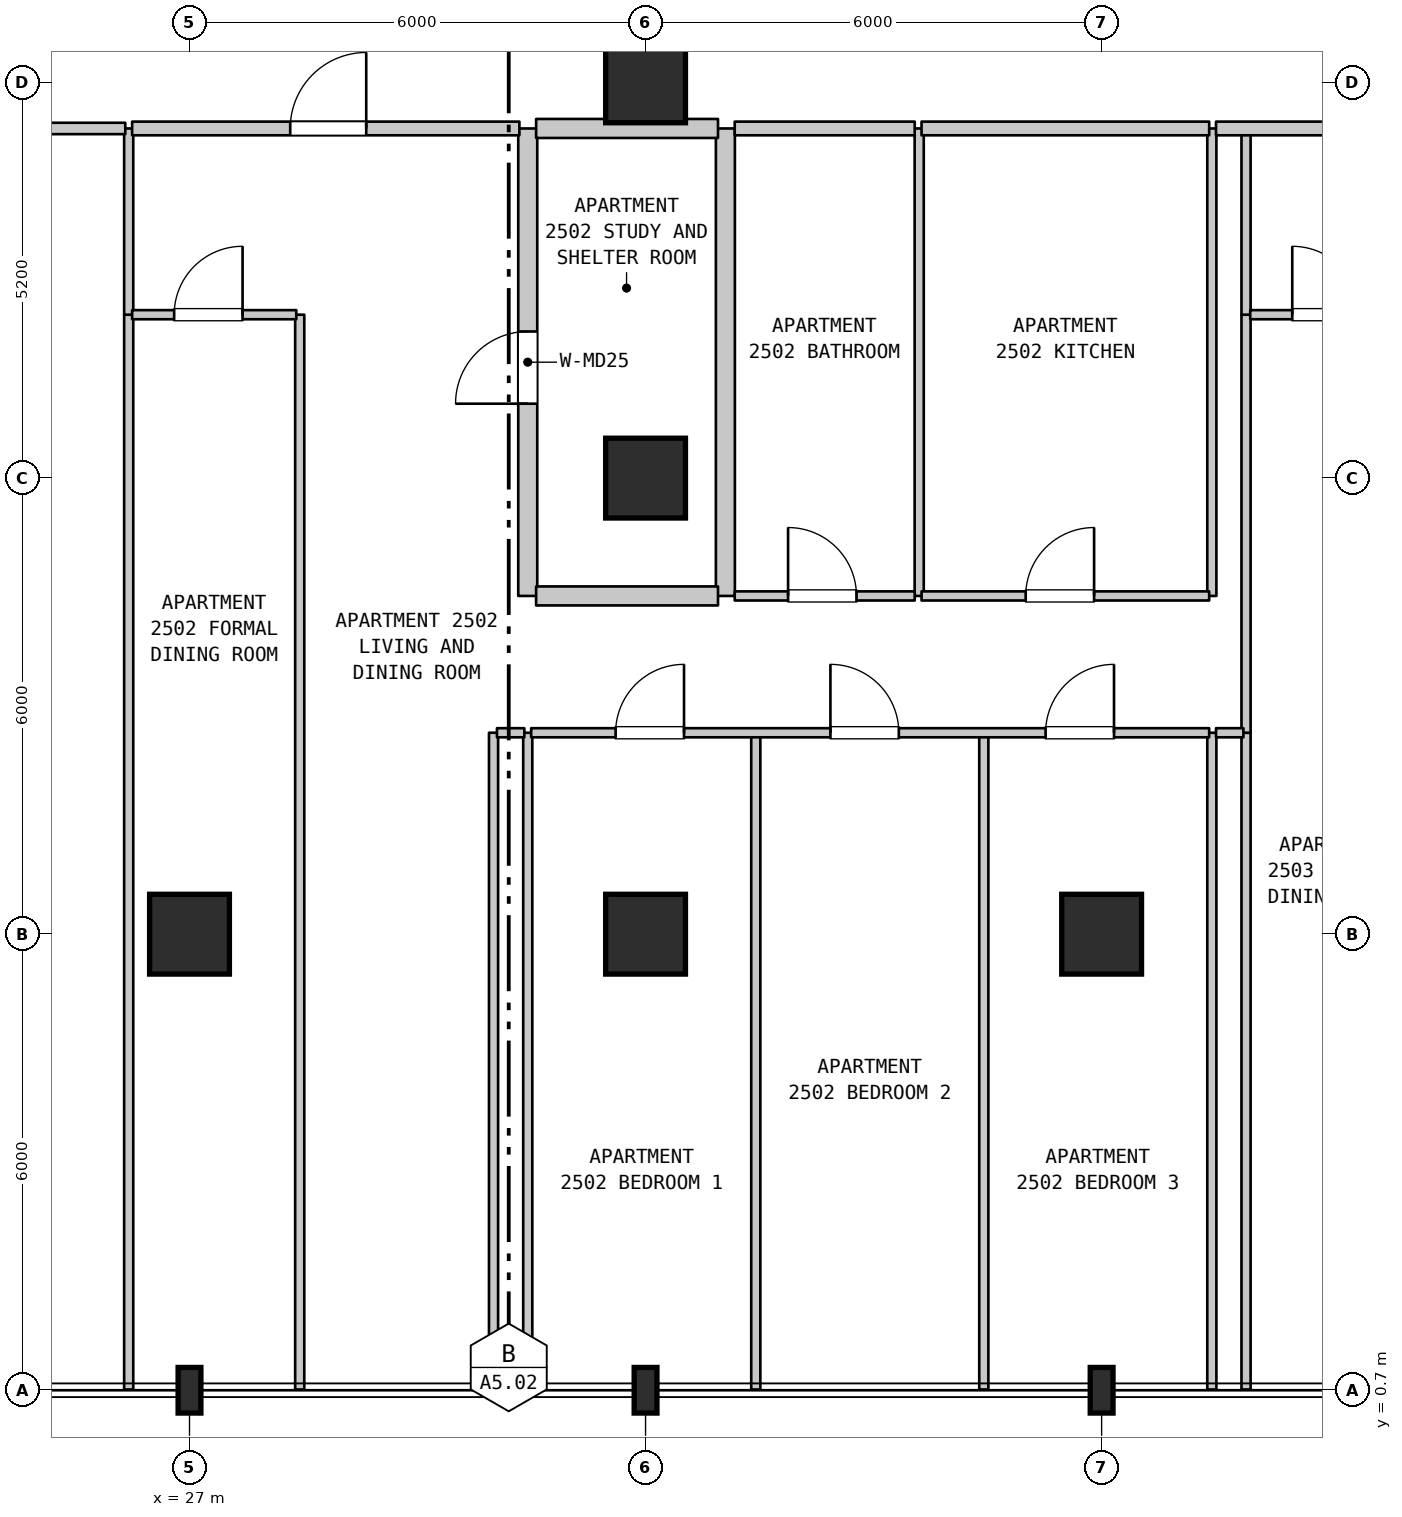
"""IFC4 building model, lengths in metres.
Left out: names, types, materials, properties, quantities, classifications, styles, units other than length and angle.
Written with IfcOpenShell. Run it as: python <this file> out.ifc"""

import sys

from ifc_helpers import new_model, si_unit, direction, frame, frame_2d, origin, origin_2d, place, context, subcontext, project, spatial, rectangle, i_section, extrude, element, fill, save


model = new_model("IFC4")
c1 = context("Model", 3, precision=1e-05, world=origin(), true_north=direction((0.0, 1.0)))
c2 = subcontext(c1, "Body", "Model", "MODEL_VIEW")
j1 = project(units=[si_unit("LENGTHUNIT", "METRE"), si_unit("PLANEANGLEUNIT", "RADIAN")], contexts=[c1])
p1 = place(None, origin())
s1 = spatial("IfcSite", under=j1, at=p1, CompositionType="ELEMENT")
p2 = place(p1, origin())
s2 = spatial("IfcBuilding", under=s1, at=p2, CompositionType="ELEMENT")
p3 = place(p2, frame((0.0, 0.0, 105.7)))
s3 = spatial("IfcBuildingStorey", under=s2, at=p3, CompositionType="ELEMENT", Elevation=105.7)
p4 = place(p3, frame((27.0, 0.7, 0.0), z_axis=(0.0, 0.0, 1.0), x_axis=(1.0, 0.0, 0.0)))
e1 = element("IfcColumn", 1, at=p4, inside=s3, PredefinedType="COLUMN", context=c2, shape_type="SweptSolid", body=[
    extrude(i_section(OverallWidth=0.3, OverallDepth=0.6, WebThickness=0.015, FlangeThickness=0.03, FilletRadius=0.027, at=origin_2d()), origin(), (0.0, 0.0, 1.0), 3.7),
])
p5 = place(p3, frame((27.0, 6.7, 0.0), z_axis=(0.0, 0.0, 1.0), x_axis=(1.0, 0.0, 0.0)))
e2 = element("IfcColumn", 2, at=p5, inside=s3, PredefinedType="COLUMN", context=c2, shape_type="SweptSolid", body=[
    extrude(rectangle(XDim=1.05, YDim=1.05, at=origin_2d()), origin(), (0.0, 0.0, 1.0), 3.7),
])
p6 = place(p3, frame((33.0, 0.7, 0.0), z_axis=(0.0, 0.0, 1.0), x_axis=(1.0, 0.0, 0.0)))
e3 = element("IfcColumn", 3, at=p6, inside=s3, PredefinedType="COLUMN", context=c2, shape_type="SweptSolid", body=[
    extrude(i_section(OverallWidth=0.3, OverallDepth=0.6, WebThickness=0.015, FlangeThickness=0.03, FilletRadius=0.027, at=origin_2d()), origin(), (0.0, 0.0, 1.0), 3.7),
])
for number, where, z_axis, x_axis in (
    (4, (33.0, 6.7, 0.0), (0.0, 0.0, 1.0), (1.0, 0.0, 0.0)),
    (5, (33.0, 12.7, 0.0), (0.0, 0.0, 1.0), (1.0, 0.0, 0.0)),
    (6, (33.0, 17.9, 0.0), (0.0, 0.0, 1.0), (1.0, 0.0, 0.0)),
):
    element("IfcColumn", number, at=place(p3, frame(where, z_axis=z_axis, x_axis=x_axis)), inside=s3, PredefinedType="COLUMN", context=c2, shape_type="SweptSolid", body=[
        extrude(rectangle(XDim=1.05, YDim=1.05, at=origin_2d()), origin(), (0.0, 0.0, 1.0), 3.7),
    ])
p7 = place(p3, frame((39.0, 0.7, 0.0), z_axis=(0.0, 0.0, 1.0), x_axis=(1.0, 0.0, 0.0)))
e7 = element("IfcColumn", 7, at=p7, inside=s3, PredefinedType="COLUMN", context=c2, shape_type="SweptSolid", body=[
    extrude(i_section(OverallWidth=0.3, OverallDepth=0.6, WebThickness=0.015, FlangeThickness=0.03, FilletRadius=0.027, at=origin_2d()), origin(), (0.0, 0.0, 1.0), 3.7),
])
p8 = place(p3, frame((39.0, 6.7, 0.0), z_axis=(0.0, 0.0, 1.0), x_axis=(1.0, 0.0, 0.0)))
e8 = element("IfcColumn", 8, at=p8, inside=s3, PredefinedType="COLUMN", context=c2, shape_type="SweptSolid", body=[
    extrude(rectangle(XDim=1.05, YDim=1.05, at=origin_2d()), origin(), (0.0, 0.0, 1.0), 3.7),
])
p9 = place(p3, frame((26.2, 0.71, 0.0), z_axis=(0.0, 0.0, 1.0), x_axis=(0.0, 1.0, 0.0)))
e9 = element("IfcWall", 9, at=p9, inside=s3, PredefinedType="PARTITIONING", context=c2, shape_type="SweptSolid", body=[
    extrude(rectangle(XDim=14.14, YDim=0.12, at=frame_2d((7.07, 0.0))), origin(), (0.0, 0.0, 1.0), 3.385),
])
p10 = place(p3, frame((26.2, 14.85, 0.0), z_axis=(0.0, 0.0, 1.0), x_axis=(0.0, 1.0, 0.0)))
e10 = element("IfcWall", 10, at=p10, inside=s3, PredefinedType="PARTITIONING", context=c2, shape_type="SweptSolid", body=[
    extrude(rectangle(XDim=2.45, YDim=0.12, at=frame_2d((1.225, 0.0))), origin(), (0.0, 0.0, 1.0), 3.385),
])
p11 = place(p3, frame((28.45, 0.71, 0.0), z_axis=(0.0, 0.0, 1.0), x_axis=(0.0, 1.0, 0.0)))
e11 = element("IfcWall", 11, at=p11, inside=s3, PredefinedType="PARTITIONING", context=c2, shape_type="SweptSolid", body=[
    extrude(rectangle(XDim=14.14, YDim=0.12, at=frame_2d((7.07, 0.0))), origin(), (0.0, 0.0, 1.0), 3.385),
])
for number, where, z_axis, x_axis in (
    (12, (31.0, 0.71, 0.0), (0.0, 0.0, 1.0), (0.0, 1.0, 0.0)),
    (13, (31.45, 0.71, 0.0), (0.0, 0.0, 1.0), (0.0, 1.0, 0.0)),
):
    element("IfcWall", number, at=place(p3, frame(where, z_axis=z_axis, x_axis=x_axis)), inside=s3, PredefinedType="PARTITIONING", context=c2, shape_type="SweptSolid", body=[
        extrude(rectangle(XDim=8.64, YDim=0.12, at=frame_2d((4.32, 0.0))), origin(), (0.0, 0.0, 1.0), 3.385),
    ])
p12 = place(p3, frame((31.45, 11.15, 0.0), z_axis=(0.0, 0.0, 1.0), x_axis=(0.0, 1.0, 0.0)))
e14 = element("IfcWall", 14, at=p12, inside=s3, PredefinedType="STANDARD", context=c2, shape_type="SweptSolid", body=[
    extrude(rectangle(XDim=6.15, YDim=0.25, at=frame_2d((3.075, 0.0))), origin(), (0.0, 0.0, 1.0), 3.385),
])
p13 = place(p12, frame((2.529, 0.0, 0.0)))
e15 = element("IfcOpeningElement", 15, at=p13, cuts=e14, PredefinedType="OPENING", context=c2, shape_type="SweptSolid", body=[
    extrude(rectangle(XDim=0.95, YDim=2.15, at=frame_2d((0.475, 1.075))), frame((0.0, 0.135, 0.0), z_axis=(0.0, -1.0, 0.0), x_axis=(1.0, 0.0, 0.0)), (0.0, 0.0, 1.0), 0.27),
])
p14 = place(p3, frame((34.05, 11.15, 0.0), z_axis=(0.0, 0.0, 1.0), x_axis=(0.0, 1.0, 0.0)))
e16 = element("IfcWall", 16, at=p14, inside=s3, PredefinedType="STANDARD", context=c2, shape_type="SweptSolid", body=[
    extrude(rectangle(XDim=6.15, YDim=0.25, at=frame_2d((3.075, 0.0))), origin(), (0.0, 0.0, 1.0), 3.385),
])
p15 = place(p3, frame((34.45, 0.71, 0.0), z_axis=(0.0, 0.0, 1.0), x_axis=(0.0, 1.0, 0.0)))
e17 = element("IfcWall", 17, at=p15, inside=s3, PredefinedType="PARTITIONING", context=c2, shape_type="SweptSolid", body=[
    extrude(rectangle(XDim=8.64, YDim=0.12, at=frame_2d((4.32, 0.0))), origin(), (0.0, 0.0, 1.0), 3.385),
])
p16 = place(p3, frame((36.6, 11.15, 0.0), z_axis=(0.0, 0.0, 1.0), x_axis=(0.0, 1.0, 0.0)))
e18 = element("IfcWall", 18, at=p16, inside=s3, PredefinedType="PARTITIONING", context=c2, shape_type="SweptSolid", body=[
    extrude(rectangle(XDim=6.15, YDim=0.12, at=frame_2d((3.075, 0.0))), origin(), (0.0, 0.0, 1.0), 3.385),
])
for number, where, z_axis, x_axis in (
    (19, (37.45, 0.71, 0.0), (0.0, 0.0, 1.0), (0.0, 1.0, 0.0)),
    (20, (40.45, 0.71, 0.0), (0.0, 0.0, 1.0), (0.0, 1.0, 0.0)),
):
    element("IfcWall", number, at=place(p3, frame(where, z_axis=z_axis, x_axis=x_axis)), inside=s3, PredefinedType="PARTITIONING", context=c2, shape_type="SweptSolid", body=[
        extrude(rectangle(XDim=8.64, YDim=0.12, at=frame_2d((4.32, 0.0))), origin(), (0.0, 0.0, 1.0), 3.385),
    ])
p17 = place(p3, frame((40.45, 11.15, 0.0), z_axis=(0.0, 0.0, 1.0), x_axis=(0.0, 1.0, 0.0)))
e21 = element("IfcWall", 21, at=p17, inside=s3, PredefinedType="PARTITIONING", context=c2, shape_type="SweptSolid", body=[
    extrude(rectangle(XDim=6.15, YDim=0.12, at=frame_2d((3.075, 0.0))), origin(), (0.0, 0.0, 1.0), 3.385),
])
p18 = place(p3, frame((40.9, 0.71, 0.0), z_axis=(0.0, 0.0, 1.0), x_axis=(0.0, 1.0, 0.0)))
e22 = element("IfcWall", 22, at=p18, inside=s3, PredefinedType="PARTITIONING", context=c2, shape_type="SweptSolid", body=[
    extrude(rectangle(XDim=8.64, YDim=0.12, at=frame_2d((4.32, 0.0))), origin(), (0.0, 0.0, 1.0), 3.385),
])
p19 = place(p3, frame((40.9, 9.35, 0.0), z_axis=(0.0, 0.0, 1.0), x_axis=(0.0, 1.0, 0.0)))
e23 = element("IfcWall", 23, at=p19, inside=s3, PredefinedType="PARTITIONING", context=c2, shape_type="SweptSolid", body=[
    extrude(rectangle(XDim=5.5, YDim=0.12, at=frame_2d((2.75, 0.0))), origin(), (0.0, 0.0, 1.0), 3.385),
])
p20 = place(p3, frame((40.9, 14.85, 0.0), z_axis=(0.0, 0.0, 1.0), x_axis=(0.0, 1.0, 0.0)))
e24 = element("IfcWall", 24, at=p20, inside=s3, PredefinedType="PARTITIONING", context=c2, shape_type="SweptSolid", body=[
    extrude(rectangle(XDim=2.45, YDim=0.12, at=frame_2d((1.225, 0.0))), origin(), (0.0, 0.0, 1.0), 3.385),
])
p21 = place(p3, frame((31.045, 9.35, 0.0), z_axis=(0.0, 0.0, 1.0), x_axis=(1.0, 0.0, 0.0)))
e25 = element("IfcWall", 25, at=p21, inside=s3, PredefinedType="PARTITIONING", context=c2, shape_type="SweptSolid", body=[
    extrude(rectangle(XDim=0.36, YDim=0.12, at=frame_2d((0.18, 0.0))), origin(), (0.0, 0.0, 1.0), 3.385),
])
p22 = place(p3, frame((31.495, 9.35, 0.0), z_axis=(0.0, 0.0, 1.0), x_axis=(1.0, 0.0, 0.0)))
e26 = element("IfcWall", 26, at=p22, inside=s3, PredefinedType="PARTITIONING", context=c2, shape_type="SweptSolid", body=[
    extrude(rectangle(XDim=8.92, YDim=0.12, at=frame_2d((4.46, 0.0))), origin(), (0.0, 0.0, 1.0), 3.385),
])
p23 = place(p22, frame((1.111, 0.0, 0.0)))
e27 = element("IfcOpeningElement", 27, at=p23, cuts=e26, PredefinedType="OPENING", context=c2, shape_type="SweptSolid", body=[
    extrude(rectangle(XDim=0.9, YDim=2.15, at=frame_2d((0.45, 1.075))), frame((0.0, 0.07, 0.0), z_axis=(0.0, -1.0, 0.0), x_axis=(1.0, 0.0, 0.0)), (0.0, 0.0, 1.0), 0.14),
])
p24 = place(p22, frame((3.937, 0.0, 0.0)))
e28 = element("IfcOpeningElement", 28, at=p24, cuts=e26, PredefinedType="OPENING", context=c2, shape_type="SweptSolid", body=[
    extrude(rectangle(XDim=0.9, YDim=2.15, at=frame_2d((0.45, 1.075))), frame((0.0, 0.07, 0.0), z_axis=(0.0, -1.0, 0.0), x_axis=(1.0, 0.0, 0.0)), (0.0, 0.0, 1.0), 0.14),
])
p25 = place(p22, frame((6.768, 0.0, 0.0)))
e29 = element("IfcOpeningElement", 29, at=p25, cuts=e26, PredefinedType="OPENING", context=c2, shape_type="SweptSolid", body=[
    extrude(rectangle(XDim=0.9, YDim=2.15, at=frame_2d((0.45, 1.075))), frame((0.0, 0.07, 0.0), z_axis=(0.0, -1.0, 0.0), x_axis=(1.0, 0.0, 0.0)), (0.0, 0.0, 1.0), 0.14),
])
p26 = place(p3, frame((40.505, 9.35, 0.0), z_axis=(0.0, 0.0, 1.0), x_axis=(1.0, 0.0, 0.0)))
e30 = element("IfcWall", 30, at=p26, inside=s3, PredefinedType="PARTITIONING", context=c2, shape_type="SweptSolid", body=[
    extrude(rectangle(XDim=0.36, YDim=0.12, at=frame_2d((0.18, 0.0))), origin(), (0.0, 0.0, 1.0), 3.385),
])
p27 = place(p3, frame((31.56, 11.15, 0.0), z_axis=(0.0, 0.0, 1.0), x_axis=(1.0, 0.0, 0.0)))
e31 = element("IfcWall", 31, at=p27, inside=s3, PredefinedType="STANDARD", context=c2, shape_type="SweptSolid", body=[
    extrude(rectangle(XDim=2.393, YDim=0.25, at=frame_2d((1.196, 0.0))), origin(), (0.0, 0.0, 1.0), 3.385),
])
p28 = place(p3, frame((34.173, 11.15, 0.0), z_axis=(0.0, 0.0, 1.0), x_axis=(1.0, 0.0, 0.0)))
e32 = element("IfcWall", 32, at=p28, inside=s3, PredefinedType="PARTITIONING", context=c2, shape_type="SweptSolid", body=[
    extrude(rectangle(XDim=2.368, YDim=0.12, at=frame_2d((1.184, 0.0))), origin(), (0.0, 0.0, 1.0), 3.385),
])
p29 = place(p28, frame((0.702, 0.0, 0.0)))
e33 = element("IfcOpeningElement", 33, at=p29, cuts=e32, PredefinedType="OPENING", context=c2, shape_type="SweptSolid", body=[
    extrude(rectangle(XDim=0.9, YDim=2.1, at=frame_2d((0.45, 1.05))), frame((0.0, 0.07, 0.0), z_axis=(0.0, -1.0, 0.0), x_axis=(1.0, 0.0, 0.0)), (0.0, 0.0, 1.0), 0.14),
])
p30 = place(p3, frame((36.631, 11.15, 0.0), z_axis=(0.0, 0.0, 1.0), x_axis=(1.0, 0.0, 0.0)))
e34 = element("IfcWall", 34, at=p30, inside=s3, PredefinedType="PARTITIONING", context=c2, shape_type="SweptSolid", body=[
    extrude(rectangle(XDim=3.784, YDim=0.12, at=frame_2d((1.892, 0.0))), origin(), (0.0, 0.0, 1.0), 3.385),
])
p31 = place(p30, frame((1.37, 0.0, 0.0)))
e35 = element("IfcOpeningElement", 35, at=p31, cuts=e34, PredefinedType="OPENING", context=c2, shape_type="SweptSolid", body=[
    extrude(rectangle(XDim=0.9, YDim=2.15, at=frame_2d((0.45, 1.075))), frame((0.0, 0.07, 0.0), z_axis=(0.0, -1.0, 0.0), x_axis=(1.0, 0.0, 0.0)), (0.0, 0.0, 1.0), 0.14),
])
p32 = place(p3, frame((26.245, 14.85, 0.0), z_axis=(0.0, 0.0, 1.0), x_axis=(1.0, 0.0, 0.0)))
e36 = element("IfcWall", 36, at=p32, inside=s3, PredefinedType="PARTITIONING", context=c2, shape_type="SweptSolid", body=[
    extrude(rectangle(XDim=2.16, YDim=0.12, at=frame_2d((1.08, 0.0))), origin(), (0.0, 0.0, 1.0), 3.385),
])
p33 = place(p32, frame((0.553, 0.0, 0.0)))
e37 = element("IfcOpeningElement", 37, at=p33, cuts=e36, PredefinedType="OPENING", context=c2, shape_type="SweptSolid", body=[
    extrude(rectangle(XDim=0.9, YDim=2.15, at=frame_2d((0.45, 1.075))), frame((0.0, 0.07, 0.0), z_axis=(0.0, -1.0, 0.0), x_axis=(1.0, 0.0, 0.0)), (0.0, 0.0, 1.0), 0.14),
])
p34 = place(p3, frame((40.955, 14.85, 0.0), z_axis=(0.0, 0.0, 1.0), x_axis=(1.0, 0.0, 0.0)))
e38 = element("IfcWall", 38, at=p34, inside=s3, PredefinedType="PARTITIONING", context=c2, shape_type="SweptSolid", body=[
    extrude(rectangle(XDim=2.16, YDim=0.12, at=frame_2d((1.08, 0.0))), origin(), (0.0, 0.0, 1.0), 3.385),
])
p35 = place(p34, frame((0.553, 0.0, 0.0)))
e39 = element("IfcOpeningElement", 39, at=p35, cuts=e38, PredefinedType="OPENING", context=c2, shape_type="SweptSolid", body=[
    extrude(rectangle(XDim=0.9, YDim=2.15, at=frame_2d((0.45, 1.075))), frame((0.0, 0.07, 0.0), z_axis=(0.0, -1.0, 0.0), x_axis=(1.0, 0.0, 0.0)), (0.0, 0.0, 1.0), 0.14),
])
p36 = place(p3, frame((21.245, 17.3, 0.0), z_axis=(0.0, 0.0, 1.0), x_axis=(1.0, 0.0, 0.0)))
e40 = element("IfcWall", 40, at=p36, inside=s3, PredefinedType="STANDARD", context=c2, shape_type="SweptSolid", body=[
    extrude(rectangle(XDim=4.91, YDim=0.15, at=frame_2d((2.455, 0.0))), origin(), (0.0, 0.0, 1.0), 3.385),
])
p37 = place(p36, frame((1.884, 0.0, 0.0)))
e41 = element("IfcOpeningElement", 41, at=p37, cuts=e40, PredefinedType="OPENING", context=c2, shape_type="SweptSolid", body=[
    extrude(rectangle(XDim=1.0, YDim=2.15, at=frame_2d((0.5, 1.075))), frame((0.0, 0.085, 0.0), z_axis=(0.0, -1.0, 0.0), x_axis=(1.0, 0.0, 0.0)), (0.0, 0.0, 1.0), 0.17),
])
p38 = place(p3, frame((26.245, 17.3, 0.0), z_axis=(0.0, 0.0, 1.0), x_axis=(1.0, 0.0, 0.0)))
e42 = element("IfcWall", 42, at=p38, inside=s3, PredefinedType="STANDARD", context=c2, shape_type="SweptSolid", body=[
    extrude(rectangle(XDim=5.095, YDim=0.18, at=frame_2d((2.547, 0.0))), origin(), (0.0, 0.0, 1.0), 3.385),
])
p39 = place(p38, frame((2.08, 0.0, 0.0)))
e43 = element("IfcOpeningElement", 43, at=p39, cuts=e42, PredefinedType="OPENING", context=c2, shape_type="SweptSolid", body=[
    extrude(rectangle(XDim=1.0, YDim=2.15, at=frame_2d((0.5, 1.075))), frame((0.0, 0.1, 0.0), z_axis=(0.0, -1.0, 0.0), x_axis=(1.0, 0.0, 0.0)), (0.0, 0.0, 1.0), 0.2),
])
p40 = place(p3, frame((31.56, 17.3, 0.0), z_axis=(0.0, 0.0, 1.0), x_axis=(1.0, 0.0, 0.0)))
e44 = element("IfcWall", 44, at=p40, inside=s3, PredefinedType="STANDARD", context=c2, shape_type="SweptSolid", body=[
    extrude(rectangle(XDim=2.393, YDim=0.25, at=frame_2d((1.196, 0.0))), origin(), (0.0, 0.0, 1.0), 3.385),
])
p41 = place(p3, frame((34.173, 17.3, 0.0), z_axis=(0.0, 0.0, 1.0), x_axis=(1.0, 0.0, 0.0)))
e45 = element("IfcWall", 45, at=p41, inside=s3, PredefinedType="STANDARD", context=c2, shape_type="SweptSolid", body=[
    extrude(rectangle(XDim=2.368, YDim=0.18, at=frame_2d((1.184, 0.0))), origin(), (0.0, 0.0, 1.0), 3.385),
])
p42 = place(p3, frame((36.631, 17.3, 0.0), z_axis=(0.0, 0.0, 1.0), x_axis=(1.0, 0.0, 0.0)))
e46 = element("IfcWall", 46, at=p42, inside=s3, PredefinedType="STANDARD", context=c2, shape_type="SweptSolid", body=[
    extrude(rectangle(XDim=3.784, YDim=0.18, at=frame_2d((1.892, 0.0))), origin(), (0.0, 0.0, 1.0), 3.385),
])
p43 = place(p3, frame((40.505, 17.3, 0.0), z_axis=(0.0, 0.0, 1.0), x_axis=(1.0, 0.0, 0.0)))
e47 = element("IfcWall", 47, at=p43, inside=s3, PredefinedType="STANDARD", context=c2, shape_type="SweptSolid", body=[
    extrude(rectangle(XDim=5.545, YDim=0.18, at=frame_2d((2.772, 0.0))), origin(), (0.0, 0.0, 1.0), 3.385),
])
p44 = place(p43, frame((2.435, 0.0, 0.0)))
e48 = element("IfcOpeningElement", 48, at=p44, cuts=e47, PredefinedType="OPENING", context=c2, shape_type="SweptSolid", body=[
    extrude(rectangle(XDim=1.0, YDim=2.15, at=frame_2d((0.5, 1.075))), frame((0.0, 0.1, 0.0), z_axis=(0.0, -1.0, 0.0), x_axis=(1.0, 0.0, 0.0)), (0.0, 0.0, 1.0), 0.2),
])
p45 = place(p13, origin())
e49 = element("IfcDoor", 49, at=p45, inside=s3, OperationType="SINGLE_SWING_LEFT", PredefinedType="DOOR", context=c2, shape_type="SweptSolid", body=[
    extrude(rectangle(XDim=0.95, YDim=2.15, at=frame_2d((0.475, 1.075))), frame((0.0, 0.025, 0.0), z_axis=(0.0, -1.0, 0.0), x_axis=(1.0, 0.0, 0.0)), (0.0, 0.0, 1.0), 0.05),
])
fill(e15, e49)
p46 = place(p23, origin())
e50 = element("IfcDoor", 50, at=p46, inside=s3, OperationType="SINGLE_SWING_RIGHT", PredefinedType="DOOR", context=c2, shape_type="SweptSolid", body=[
    extrude(rectangle(XDim=0.9, YDim=2.15, at=frame_2d((0.45, 1.075))), frame((0.0, 0.025, 0.0), z_axis=(0.0, -1.0, 0.0), x_axis=(1.0, 0.0, 0.0)), (0.0, 0.0, 1.0), 0.05),
])
fill(e27, e50)
p47 = place(p24, origin())
e51 = element("IfcDoor", 51, at=p47, inside=s3, OperationType="SINGLE_SWING_LEFT", PredefinedType="DOOR", context=c2, shape_type="SweptSolid", body=[
    extrude(rectangle(XDim=0.9, YDim=2.15, at=frame_2d((0.45, 1.075))), frame((0.0, 0.025, 0.0), z_axis=(0.0, -1.0, 0.0), x_axis=(1.0, 0.0, 0.0)), (0.0, 0.0, 1.0), 0.05),
])
fill(e28, e51)
p48 = place(p25, origin())
e52 = element("IfcDoor", 52, at=p48, inside=s3, OperationType="SINGLE_SWING_RIGHT", PredefinedType="DOOR", context=c2, shape_type="SweptSolid", body=[
    extrude(rectangle(XDim=0.9, YDim=2.15, at=frame_2d((0.45, 1.075))), frame((0.0, 0.025, 0.0), z_axis=(0.0, -1.0, 0.0), x_axis=(1.0, 0.0, 0.0)), (0.0, 0.0, 1.0), 0.05),
])
fill(e29, e52)
p49 = place(p29, origin())
e53 = element("IfcDoor", 53, at=p49, inside=s3, OperationType="SINGLE_SWING_LEFT", PredefinedType="DOOR", context=c2, shape_type="SweptSolid", body=[
    extrude(rectangle(XDim=0.9, YDim=2.1, at=frame_2d((0.45, 1.05))), frame((0.0, 0.025, 0.0), z_axis=(0.0, -1.0, 0.0), x_axis=(1.0, 0.0, 0.0)), (0.0, 0.0, 1.0), 0.05),
])
fill(e33, e53)
p50 = place(p31, origin())
e54 = element("IfcDoor", 54, at=p50, inside=s3, OperationType="SINGLE_SWING_RIGHT", PredefinedType="DOOR", context=c2, shape_type="SweptSolid", body=[
    extrude(rectangle(XDim=0.9, YDim=2.15, at=frame_2d((0.45, 1.075))), frame((0.0, 0.025, 0.0), z_axis=(0.0, -1.0, 0.0), x_axis=(1.0, 0.0, 0.0)), (0.0, 0.0, 1.0), 0.05),
])
fill(e35, e54)
p51 = place(p33, origin())
e55 = element("IfcDoor", 55, at=p51, inside=s3, OperationType="SINGLE_SWING_RIGHT", PredefinedType="DOOR", context=c2, shape_type="SweptSolid", body=[
    extrude(rectangle(XDim=0.9, YDim=2.15, at=frame_2d((0.45, 1.075))), frame((0.0, 0.025, 0.0), z_axis=(0.0, -1.0, 0.0), x_axis=(1.0, 0.0, 0.0)), (0.0, 0.0, 1.0), 0.05),
])
fill(e37, e55)
p52 = place(p35, origin())
e56 = element("IfcDoor", 56, at=p52, inside=s3, OperationType="SINGLE_SWING_LEFT", PredefinedType="DOOR", context=c2, shape_type="SweptSolid", body=[
    extrude(rectangle(XDim=0.9, YDim=2.15, at=frame_2d((0.45, 1.075))), frame((0.0, 0.025, 0.0), z_axis=(0.0, -1.0, 0.0), x_axis=(1.0, 0.0, 0.0)), (0.0, 0.0, 1.0), 0.05),
])
fill(e39, e56)
p53 = place(p39, origin())
e57 = element("IfcDoor", 57, at=p53, inside=s3, OperationType="SINGLE_SWING_RIGHT", PredefinedType="DOOR", context=c2, shape_type="SweptSolid", body=[
    extrude(rectangle(XDim=1.0, YDim=2.15, at=frame_2d((0.5, 1.075))), frame((0.0, 0.025, 0.0), z_axis=(0.0, -1.0, 0.0), x_axis=(1.0, 0.0, 0.0)), (0.0, 0.0, 1.0), 0.05),
])
fill(e43, e57)
save(model, sys.argv[1])
